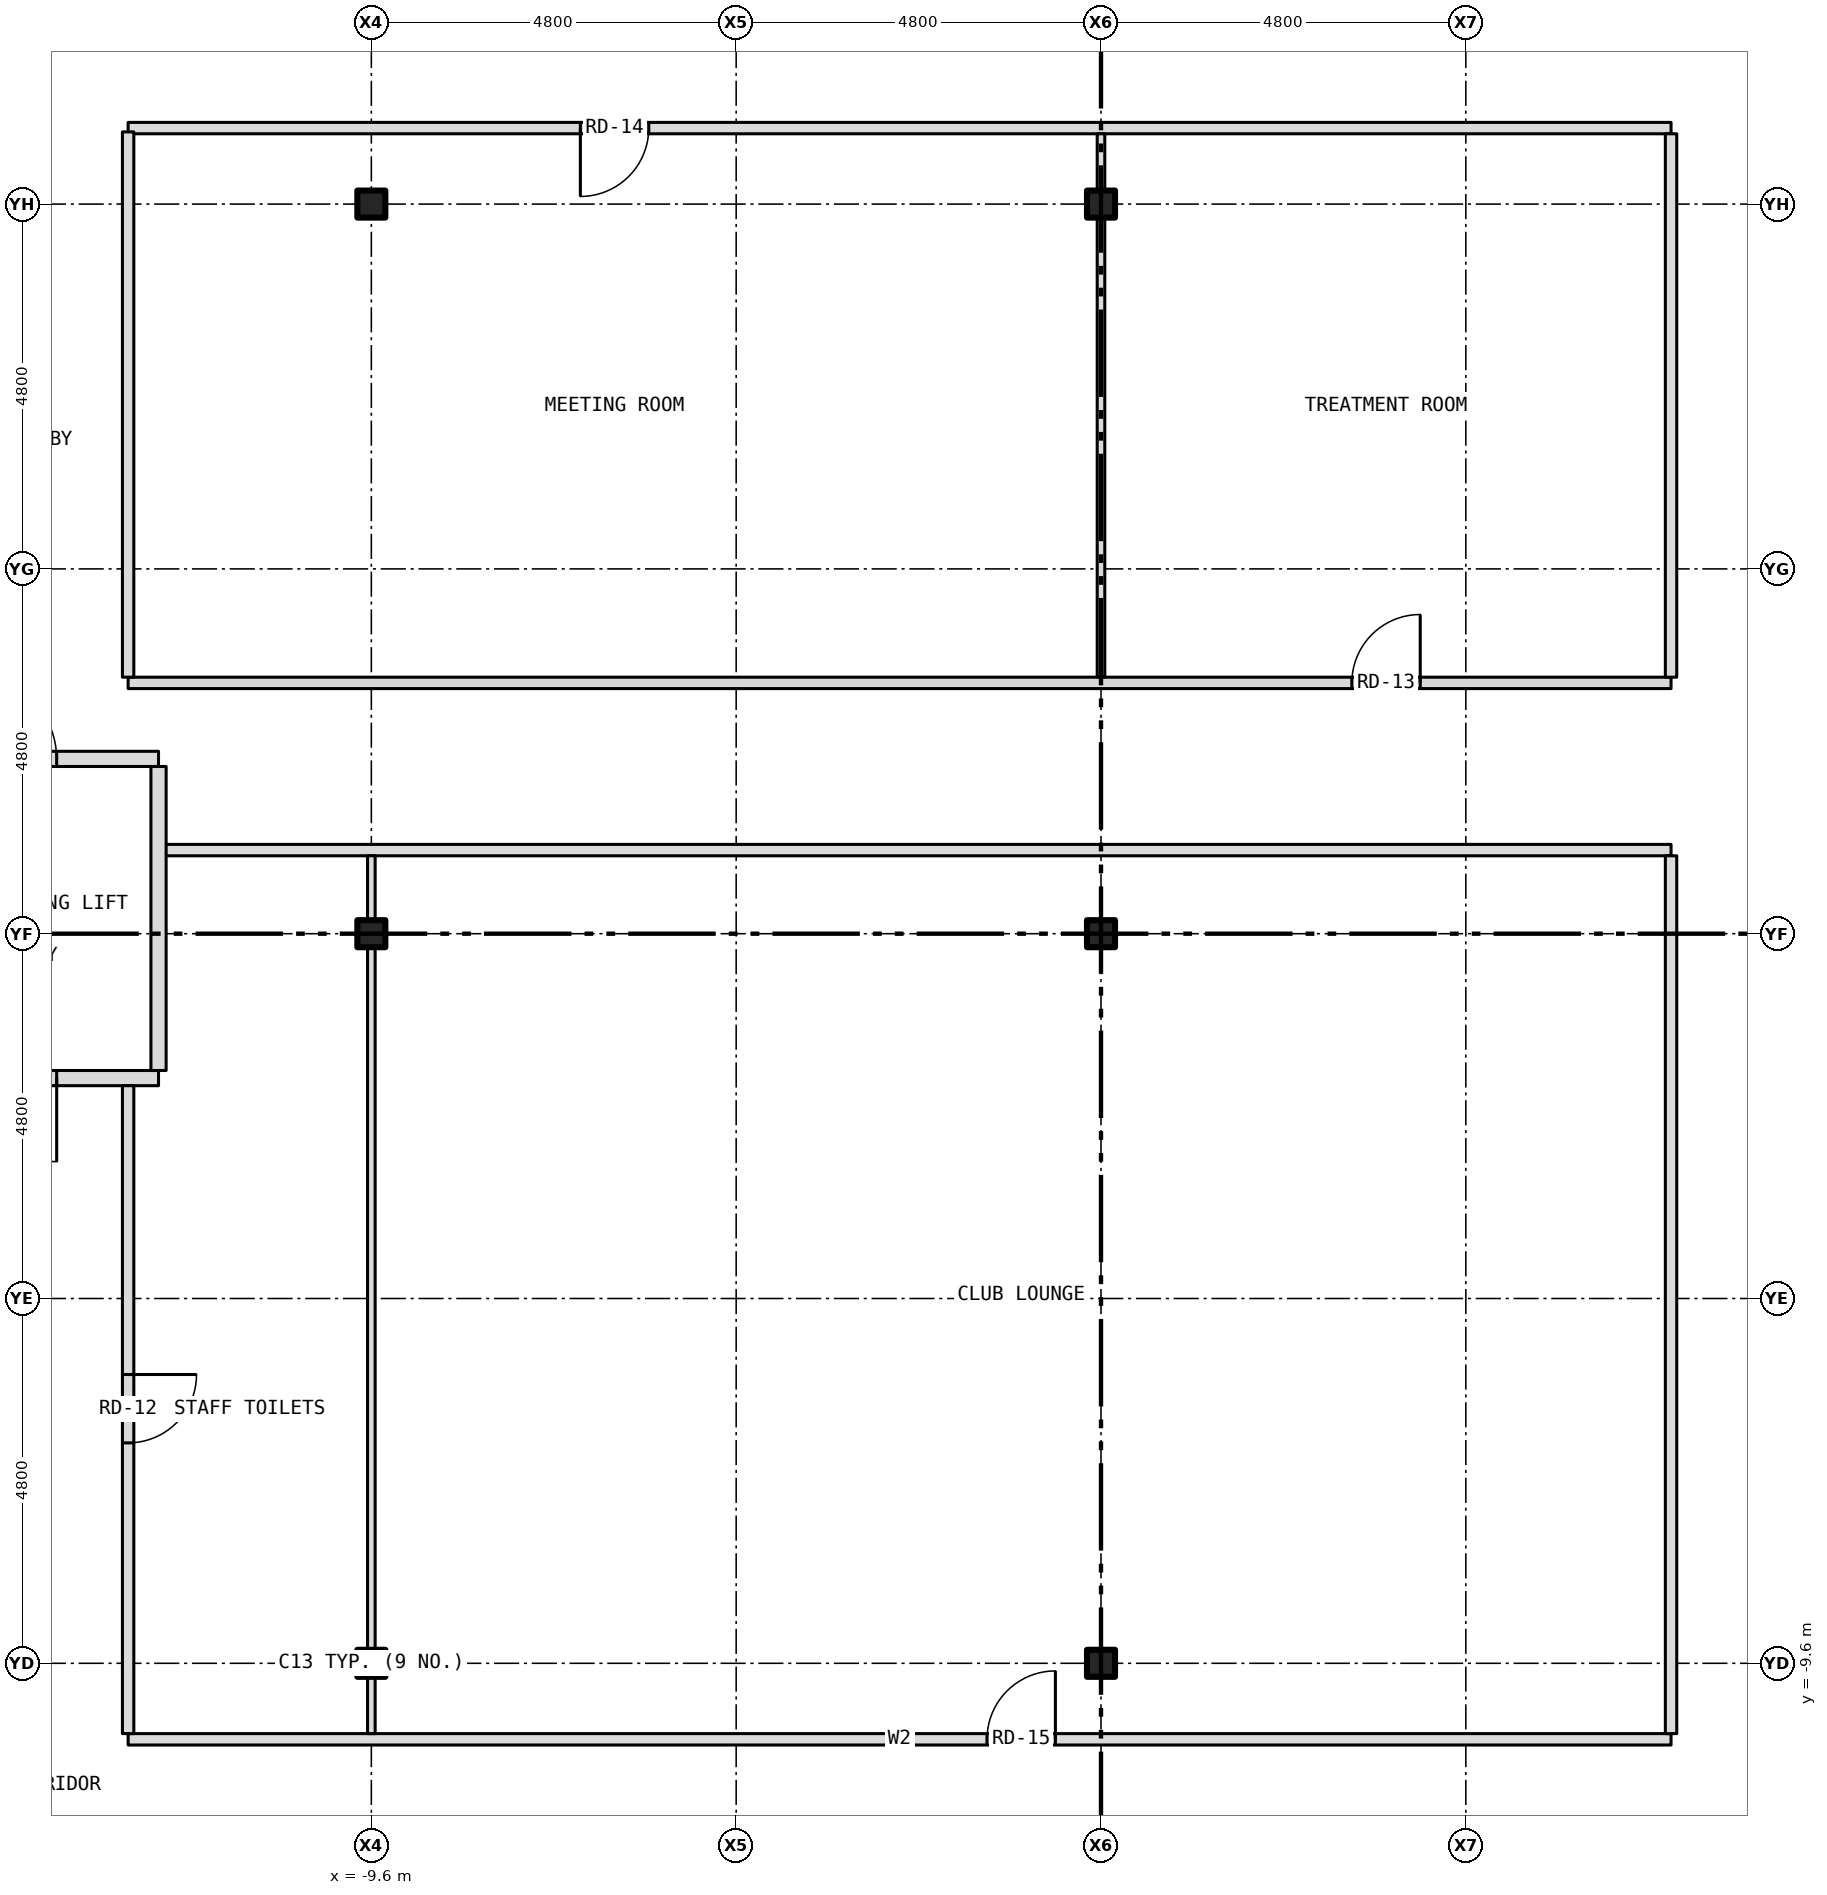
"""IFC4 building model, lengths in metres.
Left out: names, types, materials, properties, quantities, classifications, styles, units other than length and angle.
Written with IfcOpenShell. Run it as: python <this file> out.ifc"""

import sys

from ifc_helpers import new_model, si_unit, direction, frame, frame_2d, origin, origin_2d, place, context, subcontext, project, spatial, rectangle, i_section, extrude, element, fill, save


model = new_model("IFC4")
c1 = context("Model", 3, precision=1e-05, world=origin(), true_north=direction((0.0, 1.0)))
c2 = subcontext(c1, "Body", "Model", "MODEL_VIEW")
j1 = project(units=[si_unit("LENGTHUNIT", "METRE"), si_unit("PLANEANGLEUNIT", "RADIAN")], contexts=[c1])
p1 = place(None, origin())
s1 = spatial("IfcSite", under=j1, at=p1, CompositionType="ELEMENT")
p2 = place(p1, origin())
s2 = spatial("IfcBuilding", under=s1, at=p2, CompositionType="ELEMENT")
p3 = place(p2, frame((0.0, 0.0, 241.0)))
s3 = spatial("IfcBuildingStorey", under=s2, at=p3, CompositionType="ELEMENT", Elevation=241.0)
for number, where, z_axis, x_axis in (
    (1, (-9.6, -9.6, -0.15), (0.0, 0.0, 1.0), (1.0, 0.0, 0.0)),
    (2, (-9.6, 0.0, -0.15), (0.0, 0.0, 1.0), (1.0, 0.0, 0.0)),
    (3, (-9.6, 9.6, -0.15), (0.0, 0.0, 1.0), (1.0, 0.0, 0.0)),
    (4, (0.0, -9.6, -0.15), (0.0, 0.0, 1.0), (1.0, 0.0, 0.0)),
    (5, (0.0, 0.0, -0.15), (0.0, 0.0, 1.0), (1.0, 0.0, 0.0)),
    (6, (0.0, 9.6, -0.15), (0.0, 0.0, 1.0), (1.0, 0.0, 0.0)),
):
    element("IfcColumn", number, at=place(p3, frame(where, z_axis=z_axis, x_axis=x_axis)), inside=s3, PredefinedType="COLUMN", context=c2, shape_type="SweptSolid", body=[
        extrude(i_section(OverallWidth=0.368, OverallDepth=0.356, WebThickness=0.011, FlangeThickness=0.018, at=origin_2d()), origin(), (0.0, 0.0, 1.0), 3.5),
    ])
p4 = place(p3, frame((-12.8, -10.6, 0.0), z_axis=(0.0, 0.0, 1.0), x_axis=(1.0, 0.0, 0.0)))
e7 = element("IfcWall", 7, at=p4, inside=s3, PredefinedType="PARTITIONING", context=c2, shape_type="SweptSolid", body=[
    extrude(rectangle(XDim=20.3, YDim=0.15, at=frame_2d((10.15, 0.0))), origin(), (0.0, 0.0, 1.0), 3.35),
])
p5 = place(p4, frame((11.3, 0.0, 0.0)))
e8 = element("IfcOpeningElement", 8, at=p5, cuts=e7, PredefinedType="OPENING", context=c2, shape_type="SweptSolid", body=[
    extrude(rectangle(XDim=0.9, YDim=2.1, at=frame_2d((0.45, 1.05))), frame((0.0, 0.087, 0.0), z_axis=(0.0, -1.0, 0.0), x_axis=(1.0, 0.0, 0.0)), (0.0, 0.0, 1.0), 0.174),
])
p6 = place(p3, frame((-15.68, -1.9, 0.0), z_axis=(0.0, 0.0, 1.0), x_axis=(1.0, 0.0, 0.0)))
e9 = element("IfcWall", 9, at=p6, inside=s3, PredefinedType="PARTITIONING", context=c2, shape_type="SweptSolid", body=[
    extrude(rectangle(XDim=3.28, YDim=0.2, at=frame_2d((1.64, 0.0))), origin(), (0.0, 0.0, 1.0), 3.35),
])
p7 = place(p6, frame((0.84, 0.0, 0.0)))
e10 = element("IfcOpeningElement", 10, at=p7, cuts=e9, PredefinedType="OPENING", context=c2, shape_type="SweptSolid", body=[
    extrude(rectangle(XDim=1.1, YDim=2.1, at=frame_2d((0.55, 1.05))), frame((0.0, 0.112, 0.0), z_axis=(0.0, -1.0, 0.0), x_axis=(1.0, 0.0, 0.0)), (0.0, 0.0, 1.0), 0.224),
])
p8 = place(p3, frame((-12.4, 1.1, 0.0), z_axis=(0.0, 0.0, 1.0), x_axis=(1.0, 0.0, 0.0)))
e11 = element("IfcWall", 11, at=p8, inside=s3, PredefinedType="PARTITIONING", context=c2, shape_type="SweptSolid", body=[
    extrude(rectangle(XDim=19.9, YDim=0.15, at=frame_2d((9.95, 0.0))), origin(), (0.0, 0.0, 1.0), 3.35),
])
p9 = place(p3, frame((-15.68, 2.3, 0.0), z_axis=(0.0, 0.0, 1.0), x_axis=(1.0, 0.0, 0.0)))
e12 = element("IfcWall", 12, at=p9, inside=s3, PredefinedType="PARTITIONING", context=c2, shape_type="SweptSolid", body=[
    extrude(rectangle(XDim=3.28, YDim=0.2, at=frame_2d((1.64, 0.0))), origin(), (0.0, 0.0, 1.0), 3.35),
])
p10 = place(p9, frame((0.84, 0.0, 0.0)))
e13 = element("IfcOpeningElement", 13, at=p10, cuts=e12, PredefinedType="OPENING", context=c2, shape_type="SweptSolid", body=[
    extrude(rectangle(XDim=1.1, YDim=2.1, at=frame_2d((0.55, 1.05))), frame((0.0, 0.112, 0.0), z_axis=(0.0, -1.0, 0.0), x_axis=(1.0, 0.0, 0.0)), (0.0, 0.0, 1.0), 0.224),
])
p11 = place(p3, frame((-12.8, 3.3, 0.0), z_axis=(0.0, 0.0, 1.0), x_axis=(1.0, 0.0, 0.0)))
e14 = element("IfcWall", 14, at=p11, inside=s3, PredefinedType="PARTITIONING", context=c2, shape_type="SweptSolid", body=[
    extrude(rectangle(XDim=20.3, YDim=0.15, at=frame_2d((10.15, 0.0))), origin(), (0.0, 0.0, 1.0), 3.35),
])
p12 = place(p11, frame((16.1, 0.0, 0.0)))
e15 = element("IfcOpeningElement", 15, at=p12, cuts=e14, PredefinedType="OPENING", context=c2, shape_type="SweptSolid", body=[
    extrude(rectangle(XDim=0.9, YDim=2.1, at=frame_2d((0.45, 1.05))), frame((0.0, 0.087, 0.0), z_axis=(0.0, -1.0, 0.0), x_axis=(1.0, 0.0, 0.0)), (0.0, 0.0, 1.0), 0.174),
])
p13 = place(p3, frame((-12.8, 10.6, 0.0), z_axis=(0.0, 0.0, 1.0), x_axis=(1.0, 0.0, 0.0)))
e16 = element("IfcWall", 16, at=p13, inside=s3, PredefinedType="PARTITIONING", context=c2, shape_type="SweptSolid", body=[
    extrude(rectangle(XDim=20.3, YDim=0.15, at=frame_2d((10.15, 0.0))), origin(), (0.0, 0.0, 1.0), 3.35),
])
p14 = place(p13, frame((5.95, 0.0, 0.0)))
e17 = element("IfcOpeningElement", 17, at=p14, cuts=e16, PredefinedType="OPENING", context=c2, shape_type="SweptSolid", body=[
    extrude(rectangle(XDim=0.9, YDim=2.1, at=frame_2d((0.45, 1.05))), frame((0.0, 0.087, 0.0), z_axis=(0.0, -1.0, 0.0), x_axis=(1.0, 0.0, 0.0)), (0.0, 0.0, 1.0), 0.174),
])
p15 = place(p3, frame((-12.8, -10.525, 0.0), z_axis=(0.0, 0.0, 1.0), x_axis=(0.0, 1.0, 0.0)))
e18 = element("IfcWall", 18, at=p15, inside=s3, PredefinedType="PARTITIONING", context=c2, shape_type="SweptSolid", body=[
    extrude(rectangle(XDim=8.525, YDim=0.15, at=frame_2d((4.262, 0.0))), origin(), (0.0, 0.0, 1.0), 3.35),
])
p16 = place(p15, frame((3.825, 0.0, 0.0)))
e19 = element("IfcOpeningElement", 19, at=p16, cuts=e18, PredefinedType="OPENING", context=c2, shape_type="SweptSolid", body=[
    extrude(rectangle(XDim=0.9, YDim=2.1, at=frame_2d((0.45, 1.05))), frame((0.0, 0.087, 0.0), z_axis=(0.0, -1.0, 0.0), x_axis=(1.0, 0.0, 0.0)), (0.0, 0.0, 1.0), 0.174),
])
p17 = place(p3, frame((-12.8, 3.375, 0.0), z_axis=(0.0, 0.0, 1.0), x_axis=(0.0, 1.0, 0.0)))
e20 = element("IfcWall", 20, at=p17, inside=s3, PredefinedType="PARTITIONING", context=c2, shape_type="SweptSolid", body=[
    extrude(rectangle(XDim=7.175, YDim=0.15, at=frame_2d((3.587, 0.0))), origin(), (0.0, 0.0, 1.0), 3.35),
])
p18 = place(p3, frame((-12.4, -1.8, 0.0), z_axis=(0.0, 0.0, 1.0), x_axis=(0.0, 1.0, 0.0)))
e21 = element("IfcWall", 21, at=p18, inside=s3, PredefinedType="PARTITIONING", context=c2, shape_type="SweptSolid", body=[
    extrude(rectangle(XDim=4.0, YDim=0.2, at=frame_2d((2.0, 0.0))), origin(), (0.0, 0.0, 1.0), 3.35),
])
p19 = place(p3, frame((-9.6, -10.525, 0.0), z_axis=(0.0, 0.0, 1.0), x_axis=(0.0, 1.0, 0.0)))
e22 = element("IfcWall", 22, at=p19, inside=s3, PredefinedType="PARTITIONING", context=c2, shape_type="SweptSolid", body=[
    extrude(rectangle(XDim=0.741, YDim=0.1, at=frame_2d((0.371, 0.0))), origin(), (0.0, 0.0, 1.0), 2.728),
])
p20 = place(p3, frame((-9.6, -9.784, 0.0), z_axis=(0.0, 0.0, 1.0), x_axis=(0.0, 1.0, 0.0)))
e23 = element("IfcWall", 23, at=p20, inside=s3, PredefinedType="PARTITIONING", context=c2, shape_type="SweptSolid", body=[
    extrude(rectangle(XDim=0.368, YDim=0.1, at=frame_2d((0.184, 0.0))), origin(), (0.0, 0.0, 1.0), 3.35),
])
p21 = place(p3, frame((-9.6, -9.416, 0.0), z_axis=(0.0, 0.0, 1.0), x_axis=(0.0, 1.0, 0.0)))
e24 = element("IfcWall", 24, at=p21, inside=s3, PredefinedType="PARTITIONING", context=c2, shape_type="SweptSolid", body=[
    extrude(rectangle(XDim=9.232, YDim=0.1, at=frame_2d((4.616, 0.0))), origin(), (0.0, 0.0, 1.0), 2.728),
])
p22 = place(p3, frame((-9.6, -0.184, 0.0), z_axis=(0.0, 0.0, 1.0), x_axis=(0.0, 1.0, 0.0)))
e25 = element("IfcWall", 25, at=p22, inside=s3, PredefinedType="PARTITIONING", context=c2, shape_type="SweptSolid", body=[
    extrude(rectangle(XDim=0.368, YDim=0.1, at=frame_2d((0.184, 0.0))), origin(), (0.0, 0.0, 1.0), 3.35),
])
p23 = place(p3, frame((-9.6, 0.184, 0.0), z_axis=(0.0, 0.0, 1.0), x_axis=(0.0, 1.0, 0.0)))
e26 = element("IfcWall", 26, at=p23, inside=s3, PredefinedType="PARTITIONING", context=c2, shape_type="SweptSolid", body=[
    extrude(rectangle(XDim=0.841, YDim=0.1, at=frame_2d((0.42, 0.0))), origin(), (0.0, 0.0, 1.0), 2.728),
])
p24 = place(p3, frame((0.0, 3.375, 0.0), z_axis=(0.0, 0.0, 1.0), x_axis=(0.0, 1.0, 0.0)))
e27 = element("IfcWall", 27, at=p24, inside=s3, PredefinedType="PARTITIONING", context=c2, shape_type="SweptSolid", body=[
    extrude(rectangle(XDim=6.041, YDim=0.1, at=frame_2d((3.021, 0.0))), origin(), (0.0, 0.0, 1.0), 2.728),
])
p25 = place(p3, frame((0.0, 9.416, 0.0), z_axis=(0.0, 0.0, 1.0), x_axis=(0.0, 1.0, 0.0)))
e28 = element("IfcWall", 28, at=p25, inside=s3, PredefinedType="PARTITIONING", context=c2, shape_type="SweptSolid", body=[
    extrude(rectangle(XDim=0.368, YDim=0.1, at=frame_2d((0.184, 0.0))), origin(), (0.0, 0.0, 1.0), 3.35),
])
p26 = place(p3, frame((0.0, 9.784, 0.0), z_axis=(0.0, 0.0, 1.0), x_axis=(0.0, 1.0, 0.0)))
e29 = element("IfcWall", 29, at=p26, inside=s3, PredefinedType="PARTITIONING", context=c2, shape_type="SweptSolid", body=[
    extrude(rectangle(XDim=0.741, YDim=0.1, at=frame_2d((0.371, 0.0))), origin(), (0.0, 0.0, 1.0), 2.728),
])
p27 = place(p3, frame((7.5, -10.525, 0.0), z_axis=(0.0, 0.0, 1.0), x_axis=(0.0, 1.0, 0.0)))
e30 = element("IfcWall", 30, at=p27, inside=s3, PredefinedType="PARTITIONING", context=c2, shape_type="SweptSolid", body=[
    extrude(rectangle(XDim=11.55, YDim=0.15, at=frame_2d((5.775, 0.0))), origin(), (0.0, 0.0, 1.0), 3.35),
])
p28 = place(p3, frame((7.5, 3.375, 0.0), z_axis=(0.0, 0.0, 1.0), x_axis=(0.0, 1.0, 0.0)))
e31 = element("IfcWall", 31, at=p28, inside=s3, PredefinedType="PARTITIONING", context=c2, shape_type="SweptSolid", body=[
    extrude(rectangle(XDim=7.15, YDim=0.15, at=frame_2d((3.575, 0.0))), origin(), (0.0, 0.0, 1.0), 3.35),
])
p29 = place(p7, origin())
e32 = element("IfcDoor", 32, at=p29, inside=s3, OperationType="SINGLE_SWING_RIGHT", PredefinedType="DOOR", context=c2, shape_type="SweptSolid", body=[
    extrude(rectangle(XDim=1.1, YDim=2.1, at=frame_2d((0.55, 1.05))), frame((0.0, 0.025, 0.0), z_axis=(0.0, -1.0, 0.0), x_axis=(1.0, 0.0, 0.0)), (0.0, 0.0, 1.0), 0.05),
])
fill(e10, e32)
p30 = place(p10, origin())
e33 = element("IfcDoor", 33, at=p30, inside=s3, OperationType="SINGLE_SWING_LEFT", PredefinedType="DOOR", context=c2, shape_type="SweptSolid", body=[
    extrude(rectangle(XDim=1.1, YDim=2.1, at=frame_2d((0.55, 1.05))), frame((0.0, 0.025, 0.0), z_axis=(0.0, -1.0, 0.0), x_axis=(1.0, 0.0, 0.0)), (0.0, 0.0, 1.0), 0.05),
])
fill(e13, e33)
p31 = place(p16, origin())
e34 = element("IfcDoor", 34, at=p31, inside=s3, OperationType="SINGLE_SWING_RIGHT", PredefinedType="DOOR", context=c2, shape_type="SweptSolid", body=[
    extrude(rectangle(XDim=0.9, YDim=2.1, at=frame_2d((0.45, 1.05))), frame((0.0, 0.025, 0.0), z_axis=(0.0, -1.0, 0.0), x_axis=(1.0, 0.0, 0.0)), (0.0, 0.0, 1.0), 0.05),
])
fill(e19, e34)
p32 = place(p12, origin())
e35 = element("IfcDoor", 35, at=p32, inside=s3, OperationType="SINGLE_SWING_RIGHT", PredefinedType="DOOR", context=c2, shape_type="SweptSolid", body=[
    extrude(rectangle(XDim=0.9, YDim=2.1, at=frame_2d((0.45, 1.05))), frame((0.0, 0.025, 0.0), z_axis=(0.0, -1.0, 0.0), x_axis=(1.0, 0.0, 0.0)), (0.0, 0.0, 1.0), 0.05),
])
fill(e15, e35)
p33 = place(p14, origin())
e36 = element("IfcDoor", 36, at=p33, inside=s3, OperationType="SINGLE_SWING_LEFT", PredefinedType="DOOR", context=c2, shape_type="SweptSolid", body=[
    extrude(rectangle(XDim=0.9, YDim=2.1, at=frame_2d((0.45, 1.05))), frame((0.0, 0.025, 0.0), z_axis=(0.0, -1.0, 0.0), x_axis=(1.0, 0.0, 0.0)), (0.0, 0.0, 1.0), 0.05),
])
fill(e17, e36)
p34 = place(p5, origin())
e37 = element("IfcDoor", 37, at=p34, inside=s3, OperationType="SINGLE_SWING_RIGHT", PredefinedType="DOOR", context=c2, shape_type="SweptSolid", body=[
    extrude(rectangle(XDim=0.9, YDim=2.1, at=frame_2d((0.45, 1.05))), frame((0.0, 0.025, 0.0), z_axis=(0.0, -1.0, 0.0), x_axis=(1.0, 0.0, 0.0)), (0.0, 0.0, 1.0), 0.05),
])
fill(e8, e37)
save(model, sys.argv[1])
